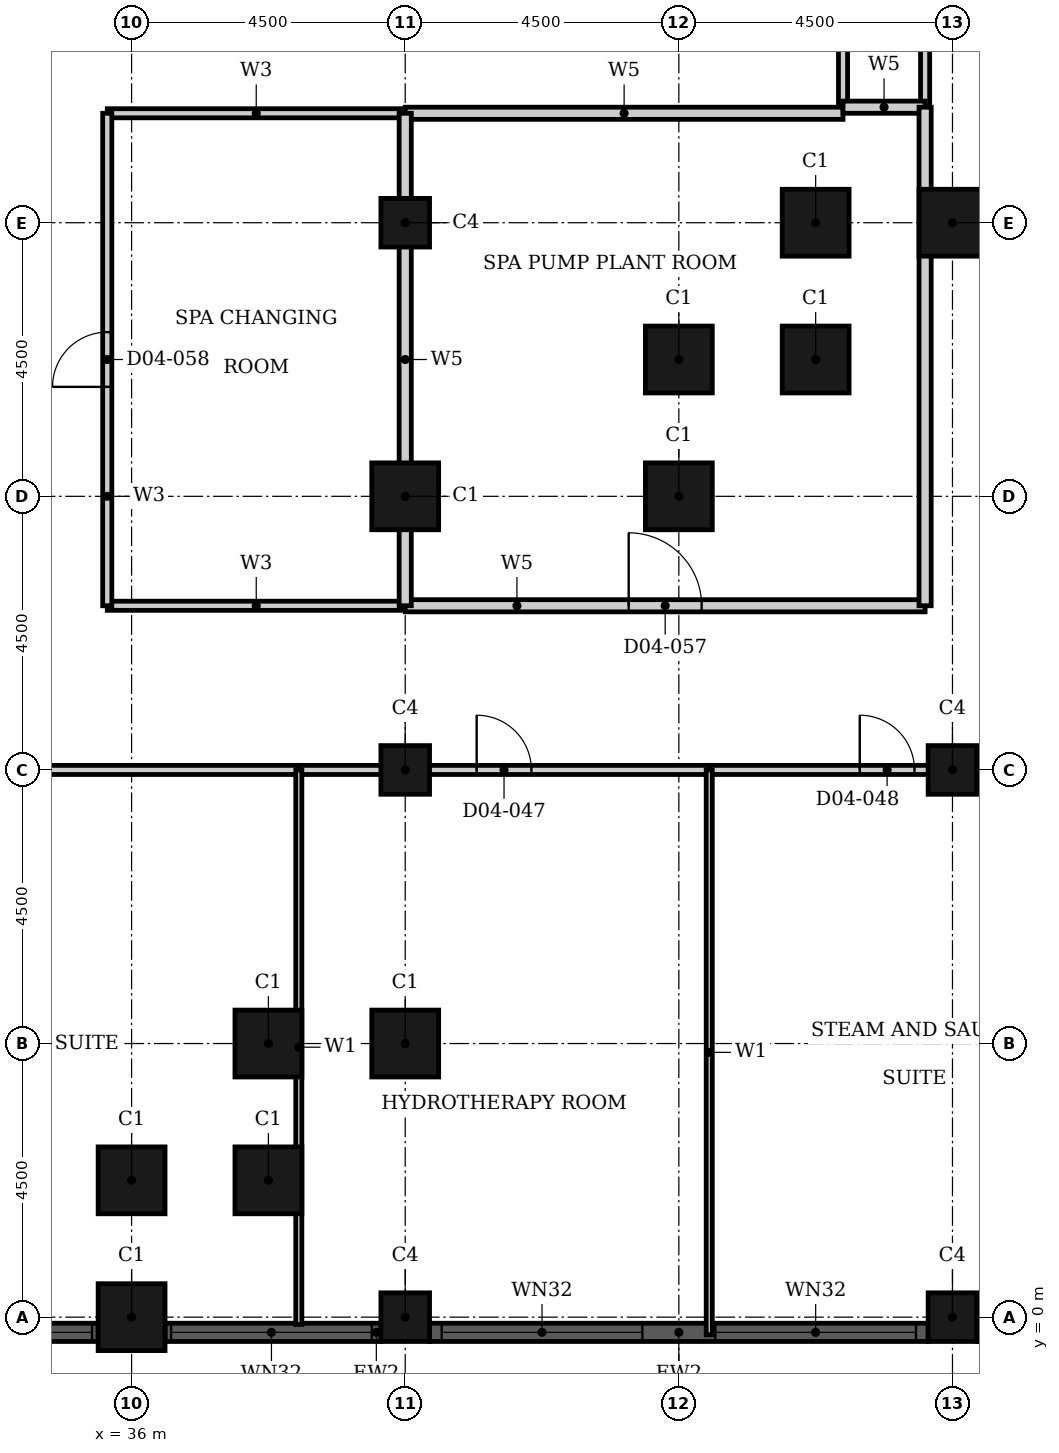
"""IFC4 building model, lengths in metres.
Left out: names, types, materials, properties, quantities, classifications, styles, units other than length and angle.
Written with IfcOpenShell. Run it as: python <this file> out.ifc"""

import sys

from ifc_helpers import new_model, si_unit, direction, frame, frame_2d, origin, origin_2d, place, context, subcontext, project, spatial, rectangle, hollow_rectangle, extrude, element, fill, save


model = new_model("IFC4")
c1 = context("Model", 3, precision=1e-05, world=origin(), true_north=direction((0.0, 1.0)))
c2 = subcontext(c1, "Body", "Model", "MODEL_VIEW")
j1 = project(units=[si_unit("LENGTHUNIT", "METRE"), si_unit("PLANEANGLEUNIT", "RADIAN")], contexts=[c1])
p1 = place(None, origin())
s1 = spatial("IfcSite", under=j1, at=p1, CompositionType="ELEMENT")
p2 = place(p1, origin())
s2 = spatial("IfcBuilding", under=s1, at=p2, CompositionType="ELEMENT")
p3 = place(p2, frame((0.0, 0.0, 24.0)))
s3 = spatial("IfcBuildingStorey", under=s2, at=p3, CompositionType="ELEMENT", Elevation=24.0)
for number, where, z_axis, x_axis in (
    (1, (36.0, 0.0, 0.0), (0.0, 0.0, 1.0), (1.0, 0.0, 0.0)),
    (2, (36.0, 2.25, 0.0), (0.0, 0.0, 1.0), (1.0, 0.0, 0.0)),
    (3, (38.25, 2.25, 0.0), (0.0, 0.0, 1.0), (1.0, 0.0, 0.0)),
    (4, (38.25, 4.5, 0.0), (0.0, 0.0, 1.0), (1.0, 0.0, 0.0)),
    (5, (40.5, 4.5, 0.0), (0.0, 0.0, 1.0), (1.0, 0.0, 0.0)),
    (6, (40.5, 13.5, 0.0), (0.0, 0.0, 1.0), (1.0, 0.0, 0.0)),
    (7, (45.0, 13.5, 0.0), (0.0, 0.0, 1.0), (1.0, 0.0, 0.0)),
    (8, (45.0, 15.75, 0.0), (0.0, 0.0, 1.0), (1.0, 0.0, 0.0)),
    (9, (47.25, 15.75, 0.0), (0.0, 0.0, 1.0), (1.0, 0.0, 0.0)),
    (10, (47.25, 18.0, 0.0), (0.0, 0.0, 1.0), (1.0, 0.0, 0.0)),
    (11, (49.5, 18.0, 0.0), (0.0, 0.0, 1.0), (1.0, 0.0, 0.0)),
):
    element("IfcColumn", number, at=place(p3, frame(where, z_axis=z_axis, x_axis=x_axis)), inside=s3, PredefinedType="COLUMN", context=c2, shape_type="SweptSolid", body=[
        extrude(hollow_rectangle(XDim=1.1, YDim=1.1, WallThickness=0.036, at=origin_2d()), origin(), (0.0, 0.0, 1.0), 4.8),
    ])
for number, where, z_axis, x_axis in (
    (12, (40.5, 0.0, 0.0), (0.0, 0.0, 1.0), (1.0, 0.0, 0.0)),
    (13, (49.5, 0.0, 0.0), (0.0, 0.0, 1.0), (1.0, 0.0, 0.0)),
    (14, (40.5, 9.0, 0.0), (0.0, 0.0, 1.0), (1.0, 0.0, 0.0)),
    (15, (40.5, 18.0, 0.0), (0.0, 0.0, 1.0), (1.0, 0.0, 0.0)),
    (16, (49.5, 9.0, 0.0), (0.0, 0.0, 1.0), (1.0, 0.0, 0.0)),
):
    element("IfcColumn", number, at=place(p3, frame(where, z_axis=z_axis, x_axis=x_axis)), inside=s3, PredefinedType="COLUMN", context=c2, shape_type="SweptSolid", body=[
        extrude(hollow_rectangle(XDim=0.8, YDim=0.8, WallThickness=0.025, at=origin_2d()), origin(), (0.0, 0.0, 1.0), 4.8),
    ])
p4 = place(p3, frame((31.9, -0.25, 0.0), z_axis=(0.0, 0.0, 1.0), x_axis=(1.0, 0.0, 0.0)))
e17 = element("IfcWall", 17, at=p4, inside=s3, PredefinedType="SOLIDWALL", context=c2, shape_type="SweptSolid", body=[
    extrude(rectangle(XDim=3.55, YDim=0.3, at=frame_2d((1.775, 0.0))), origin(), (0.0, 0.0, 1.0), 4.8),
])
p5 = place(p4, frame((0.15, 0.0, 0.9)))
e18 = element("IfcOpeningElement", 18, at=p5, cuts=e17, PredefinedType="OPENING", context=c2, shape_type="SweptSolid", body=[
    extrude(rectangle(XDim=3.3, YDim=2.9, at=frame_2d((1.65, 1.45))), frame((0.0, 0.16, 0.0), z_axis=(0.0, -1.0, 0.0), x_axis=(1.0, 0.0, 0.0)), (0.0, 0.0, 1.0), 0.32),
])
p6 = place(p3, frame((36.55, -0.25, 0.0), z_axis=(0.0, 0.0, 1.0), x_axis=(1.0, 0.0, 0.0)))
e19 = element("IfcWall", 19, at=p6, inside=s3, PredefinedType="SOLIDWALL", context=c2, shape_type="SweptSolid", body=[
    extrude(rectangle(XDim=3.55, YDim=0.3, at=frame_2d((1.775, 0.0))), origin(), (0.0, 0.0, 1.0), 4.8),
])
p7 = place(p6, frame((0.1, 0.0, 0.9)))
e20 = element("IfcOpeningElement", 20, at=p7, cuts=e19, PredefinedType="OPENING", context=c2, shape_type="SweptSolid", body=[
    extrude(rectangle(XDim=3.3, YDim=2.9, at=frame_2d((1.65, 1.45))), frame((0.0, 0.16, 0.0), z_axis=(0.0, -1.0, 0.0), x_axis=(1.0, 0.0, 0.0)), (0.0, 0.0, 1.0), 0.32),
])
p8 = place(p3, frame((40.9, -0.25, 0.0), z_axis=(0.0, 0.0, 1.0), x_axis=(1.0, 0.0, 0.0)))
e21 = element("IfcWall", 21, at=p8, inside=s3, PredefinedType="SOLIDWALL", context=c2, shape_type="SweptSolid", body=[
    extrude(rectangle(XDim=8.2, YDim=0.3, at=frame_2d((4.1, 0.0))), origin(), (0.0, 0.0, 1.0), 4.8),
])
p9 = place(p8, frame((0.2, 0.0, 0.9)))
e22 = element("IfcOpeningElement", 22, at=p9, cuts=e21, PredefinedType="OPENING", context=c2, shape_type="SweptSolid", body=[
    extrude(rectangle(XDim=3.3, YDim=2.9, at=frame_2d((1.65, 1.45))), frame((0.0, 0.16, 0.0), z_axis=(0.0, -1.0, 0.0), x_axis=(1.0, 0.0, 0.0)), (0.0, 0.0, 1.0), 0.32),
])
p10 = place(p8, frame((4.7, 0.0, 0.9)))
e23 = element("IfcOpeningElement", 23, at=p10, cuts=e21, PredefinedType="OPENING", context=c2, shape_type="SweptSolid", body=[
    extrude(rectangle(XDim=3.3, YDim=2.9, at=frame_2d((1.65, 1.45))), frame((0.0, 0.16, 0.0), z_axis=(0.0, -1.0, 0.0), x_axis=(1.0, 0.0, 0.0)), (0.0, 0.0, 1.0), 0.32),
])
p11 = place(p3, frame((49.9, -0.25, 0.0), z_axis=(0.0, 0.0, 1.0), x_axis=(1.0, 0.0, 0.0)))
e24 = element("IfcWall", 24, at=p11, inside=s3, PredefinedType="SOLIDWALL", context=c2, shape_type="SweptSolid", body=[
    extrude(rectangle(XDim=8.2, YDim=0.3, at=frame_2d((4.1, 0.0))), origin(), (0.0, 0.0, 1.0), 4.8),
])
p12 = place(p11, frame((0.2, 0.0, 0.9)))
e25 = element("IfcOpeningElement", 25, at=p12, cuts=e24, PredefinedType="OPENING", context=c2, shape_type="SweptSolid", body=[
    extrude(rectangle(XDim=3.3, YDim=2.9, at=frame_2d((1.65, 1.45))), frame((0.0, 0.16, 0.0), z_axis=(0.0, -1.0, 0.0), x_axis=(1.0, 0.0, 0.0)), (0.0, 0.0, 1.0), 0.32),
])
p13 = place(p11, frame((4.7, 0.0, 0.9)))
e26 = element("IfcOpeningElement", 26, at=p13, cuts=e24, PredefinedType="OPENING", context=c2, shape_type="SweptSolid", body=[
    extrude(rectangle(XDim=3.3, YDim=2.9, at=frame_2d((1.65, 1.45))), frame((0.0, 0.16, 0.0), z_axis=(0.0, -1.0, 0.0), x_axis=(1.0, 0.0, 0.0)), (0.0, 0.0, 1.0), 0.32),
])
for number, where, z_axis, x_axis in (
    (27, (35.6, 11.7, 0.0), (0.0, 0.0, 1.0), (1.0, 0.0, 0.0)),
    (28, (35.6, 19.8, 0.0), (0.0, 0.0, 1.0), (1.0, 0.0, 0.0)),
):
    element("IfcWall", number, at=place(p3, frame(where, z_axis=z_axis, x_axis=x_axis)), inside=s3, PredefinedType="PARTITIONING", context=c2, shape_type="SweptSolid", body=[
        extrude(rectangle(XDim=4.9, YDim=0.15, at=frame_2d((2.45, 0.0))), origin(), (0.0, 0.0, 1.0), 4.45),
    ])
p14 = place(p3, frame((28.75, 9.0, 0.0), z_axis=(0.0, 0.0, 1.0), x_axis=(1.0, 0.0, 0.0)))
e29 = element("IfcWall", 29, at=p14, inside=s3, PredefinedType="PARTITIONING", context=c2, shape_type="SweptSolid", body=[
    extrude(rectangle(XDim=10.0, YDim=0.15, at=frame_2d((5.0, 0.0))), origin(), (0.0, 0.0, 1.0), 4.45),
])
p15 = place(p14, frame((4.55, 0.0, 0.0)))
e30 = element("IfcOpeningElement", 30, at=p15, cuts=e29, PredefinedType="OPENING", context=c2, shape_type="SweptSolid", body=[
    extrude(rectangle(XDim=0.9, YDim=2.1, at=frame_2d((0.45, 1.05))), frame((0.0, 0.085, 0.0), z_axis=(0.0, -1.0, 0.0), x_axis=(1.0, 0.0, 0.0)), (0.0, 0.0, 1.0), 0.17),
])
p16 = place(p3, frame((38.75, 9.0, 0.0), z_axis=(0.0, 0.0, 1.0), x_axis=(1.0, 0.0, 0.0)))
e31 = element("IfcWall", 31, at=p16, inside=s3, PredefinedType="PARTITIONING", context=c2, shape_type="SweptSolid", body=[
    extrude(rectangle(XDim=6.75, YDim=0.15, at=frame_2d((3.375, 0.0))), origin(), (0.0, 0.0, 1.0), 4.45),
])
p17 = place(p16, frame((2.925, 0.0, 0.0)))
e32 = element("IfcOpeningElement", 32, at=p17, cuts=e31, PredefinedType="OPENING", context=c2, shape_type="SweptSolid", body=[
    extrude(rectangle(XDim=0.9, YDim=2.1, at=frame_2d((0.45, 1.05))), frame((0.0, 0.085, 0.0), z_axis=(0.0, -1.0, 0.0), x_axis=(1.0, 0.0, 0.0)), (0.0, 0.0, 1.0), 0.17),
])
p18 = place(p3, frame((45.5, 9.0, 0.0), z_axis=(0.0, 0.0, 1.0), x_axis=(1.0, 0.0, 0.0)))
e33 = element("IfcWall", 33, at=p18, inside=s3, PredefinedType="PARTITIONING", context=c2, shape_type="SweptSolid", body=[
    extrude(rectangle(XDim=6.75, YDim=0.15, at=frame_2d((3.375, 0.0))), origin(), (0.0, 0.0, 1.0), 4.45),
])
p19 = place(p18, frame((2.475, 0.0, 0.0)))
e34 = element("IfcOpeningElement", 34, at=p19, cuts=e33, PredefinedType="OPENING", context=c2, shape_type="SweptSolid", body=[
    extrude(rectangle(XDim=0.9, YDim=2.1, at=frame_2d((0.45, 1.05))), frame((0.0, 0.085, 0.0), z_axis=(0.0, -1.0, 0.0), x_axis=(1.0, 0.0, 0.0)), (0.0, 0.0, 1.0), 0.17),
])
p20 = place(p3, frame((35.6, 11.7, 0.0), z_axis=(0.0, 0.0, 1.0), x_axis=(0.0, 1.0, 0.0)))
e35 = element("IfcWall", 35, at=p20, inside=s3, PredefinedType="PARTITIONING", context=c2, shape_type="SweptSolid", body=[
    extrude(rectangle(XDim=8.1, YDim=0.15, at=frame_2d((4.05, 0.0))), origin(), (0.0, 0.0, 1.0), 4.45),
])
p21 = place(p20, frame((3.6, 0.0, 0.0)))
e36 = element("IfcOpeningElement", 36, at=p21, cuts=e35, PredefinedType="OPENING", context=c2, shape_type="SweptSolid", body=[
    extrude(rectangle(XDim=0.9, YDim=2.1, at=frame_2d((0.45, 1.05))), frame((0.0, 0.085, 0.0), z_axis=(0.0, -1.0, 0.0), x_axis=(1.0, 0.0, 0.0)), (0.0, 0.0, 1.0), 0.17),
])
p22 = place(p3, frame((47.7, 19.9, 0.0), z_axis=(0.0, 0.0, 1.0), x_axis=(0.0, 1.0, 0.0)))
e37 = element("IfcWall", 37, at=p22, inside=s3, PredefinedType="PARTITIONING", context=c2, shape_type="SweptSolid", body=[
    extrude(rectangle(XDim=14.3, YDim=0.15, at=frame_2d((7.15, 0.0))), origin(), (0.0, 0.0, 1.0), 4.45),
])
p23 = place(p22, frame((6.7, 0.0, 0.0)))
e38 = element("IfcOpeningElement", 38, at=p23, cuts=e37, PredefinedType="OPENING", context=c2, shape_type="SweptSolid", body=[
    extrude(rectangle(XDim=0.9, YDim=2.1, at=frame_2d((0.45, 1.05))), frame((0.0, 0.085, 0.0), z_axis=(0.0, -1.0, 0.0), x_axis=(1.0, 0.0, 0.0)), (0.0, 0.0, 1.0), 0.17),
])
p24 = place(p3, frame((49.05, 19.9, 0.0), z_axis=(0.0, 0.0, 1.0), x_axis=(0.0, 1.0, 0.0)))
e39 = element("IfcWall", 39, at=p24, inside=s3, PredefinedType="PARTITIONING", context=c2, shape_type="SweptSolid", body=[
    extrude(rectangle(XDim=2.75, YDim=0.15, at=frame_2d((1.375, 0.0))), origin(), (0.0, 0.0, 1.0), 4.45),
])
p25 = place(p3, frame((38.75, -0.12, 0.0), z_axis=(0.0, 0.0, 1.0), x_axis=(0.0, 1.0, 0.0)))
e40 = element("IfcWall", 40, at=p25, inside=s3, PredefinedType="PARTITIONING", context=c2, shape_type="SweptSolid", body=[
    extrude(rectangle(XDim=9.12, YDim=0.1, at=frame_2d((4.56, 0.0))), origin(), (0.0, 0.0, 1.0), 4.45),
])
p26 = place(p3, frame((45.5, -0.29, 0.0), z_axis=(0.0, 0.0, 1.0), x_axis=(0.0, 1.0, 0.0)))
e41 = element("IfcWall", 41, at=p26, inside=s3, PredefinedType="PARTITIONING", context=c2, shape_type="SweptSolid", body=[
    extrude(rectangle(XDim=9.29, YDim=0.1, at=frame_2d((4.645, 0.0))), origin(), (0.0, 0.0, 1.0), 4.45),
])
p27 = place(p3, frame((40.5, 11.7, 0.0), z_axis=(0.0, 0.0, 1.0), x_axis=(1.0, 0.0, 0.0)))
e42 = element("IfcWall", 42, at=p27, inside=s3, PredefinedType="PARTITIONING", context=c2, shape_type="SweptSolid", body=[
    extrude(rectangle(XDim=8.55, YDim=0.2, at=frame_2d((4.275, 0.0))), origin(), (0.0, 0.0, 1.0), 4.45),
])
p28 = place(p27, frame((3.675, 0.0, 0.0)))
e43 = element("IfcOpeningElement", 43, at=p28, cuts=e42, PredefinedType="OPENING", context=c2, shape_type="SweptSolid", body=[
    extrude(rectangle(XDim=1.2, YDim=2.1, at=frame_2d((0.6, 1.05))), frame((0.0, 0.11, 0.0), z_axis=(0.0, -1.0, 0.0), x_axis=(1.0, 0.0, 0.0)), (0.0, 0.0, 1.0), 0.22),
])
p29 = place(p3, frame((40.5, 19.8, 0.0), z_axis=(0.0, 0.0, 1.0), x_axis=(1.0, 0.0, 0.0)))
e44 = element("IfcWall", 44, at=p29, inside=s3, PredefinedType="PARTITIONING", context=c2, shape_type="SweptSolid", body=[
    extrude(rectangle(XDim=7.2, YDim=0.2, at=frame_2d((3.6, 0.0))), origin(), (0.0, 0.0, 1.0), 4.45),
])
p30 = place(p3, frame((47.7, 19.9, 0.0), z_axis=(0.0, 0.0, 1.0), x_axis=(1.0, 0.0, 0.0)))
e45 = element("IfcWall", 45, at=p30, inside=s3, PredefinedType="PARTITIONING", context=c2, shape_type="SweptSolid", body=[
    extrude(rectangle(XDim=1.35, YDim=0.2, at=frame_2d((0.675, 0.0))), origin(), (0.0, 0.0, 1.0), 4.45),
])
p31 = place(p3, frame((40.5, 11.7, 0.0), z_axis=(0.0, 0.0, 1.0), x_axis=(0.0, 1.0, 0.0)))
e46 = element("IfcWall", 46, at=p31, inside=s3, PredefinedType="PARTITIONING", context=c2, shape_type="SweptSolid", body=[
    extrude(rectangle(XDim=8.1, YDim=0.2, at=frame_2d((4.05, 0.0))), origin(), (0.0, 0.0, 1.0), 4.45),
])
p32 = place(p3, frame((49.05, 11.7, 0.0), z_axis=(0.0, 0.0, 1.0), x_axis=(0.0, 1.0, 0.0)))
e47 = element("IfcWall", 47, at=p32, inside=s3, PredefinedType="PARTITIONING", context=c2, shape_type="SweptSolid", body=[
    extrude(rectangle(XDim=8.2, YDim=0.2, at=frame_2d((4.1, 0.0))), origin(), (0.0, 0.0, 1.0), 4.45),
])
p33 = place(p5, origin())
e48 = element("IfcWindow", 48, at=p33, inside=s3, PartitioningType="SINGLE_PANEL", PredefinedType="WINDOW", context=c2, shape_type="SweptSolid", body=[
    extrude(rectangle(XDim=3.3, YDim=2.9, at=frame_2d((1.65, 1.45))), frame((0.0, 0.03, 0.0), z_axis=(0.0, -1.0, 0.0), x_axis=(1.0, 0.0, 0.0)), (0.0, 0.0, 1.0), 0.06),
])
fill(e18, e48)
p34 = place(p7, origin())
e49 = element("IfcWindow", 49, at=p34, inside=s3, PartitioningType="SINGLE_PANEL", PredefinedType="WINDOW", context=c2, shape_type="SweptSolid", body=[
    extrude(rectangle(XDim=3.3, YDim=2.9, at=frame_2d((1.65, 1.45))), frame((0.0, 0.03, 0.0), z_axis=(0.0, -1.0, 0.0), x_axis=(1.0, 0.0, 0.0)), (0.0, 0.0, 1.0), 0.06),
])
fill(e20, e49)
p35 = place(p9, origin())
e50 = element("IfcWindow", 50, at=p35, inside=s3, PartitioningType="SINGLE_PANEL", PredefinedType="WINDOW", context=c2, shape_type="SweptSolid", body=[
    extrude(rectangle(XDim=3.3, YDim=2.9, at=frame_2d((1.65, 1.45))), frame((0.0, 0.03, 0.0), z_axis=(0.0, -1.0, 0.0), x_axis=(1.0, 0.0, 0.0)), (0.0, 0.0, 1.0), 0.06),
])
fill(e22, e50)
p36 = place(p10, origin())
e51 = element("IfcWindow", 51, at=p36, inside=s3, PartitioningType="SINGLE_PANEL", PredefinedType="WINDOW", context=c2, shape_type="SweptSolid", body=[
    extrude(rectangle(XDim=3.3, YDim=2.9, at=frame_2d((1.65, 1.45))), frame((0.0, 0.03, 0.0), z_axis=(0.0, -1.0, 0.0), x_axis=(1.0, 0.0, 0.0)), (0.0, 0.0, 1.0), 0.06),
])
fill(e23, e51)
p37 = place(p17, origin())
e52 = element("IfcDoor", 52, at=p37, inside=s3, OperationType="SINGLE_SWING_RIGHT", PredefinedType="DOOR", context=c2, shape_type="SweptSolid", body=[
    extrude(rectangle(XDim=0.9, YDim=2.1, at=frame_2d((0.45, 1.05))), frame((0.0, 0.025, 0.0), z_axis=(0.0, -1.0, 0.0), x_axis=(1.0, 0.0, 0.0)), (0.0, 0.0, 1.0), 0.05),
])
fill(e32, e52)
p38 = place(p19, origin())
e53 = element("IfcDoor", 53, at=p38, inside=s3, OperationType="SINGLE_SWING_LEFT", PredefinedType="DOOR", context=c2, shape_type="SweptSolid", body=[
    extrude(rectangle(XDim=0.9, YDim=2.1, at=frame_2d((0.45, 1.05))), frame((0.0, 0.025, 0.0), z_axis=(0.0, -1.0, 0.0), x_axis=(1.0, 0.0, 0.0)), (0.0, 0.0, 1.0), 0.05),
])
fill(e34, e53)
p39 = place(p28, origin())
e54 = element("IfcDoor", 54, at=p39, inside=s3, OperationType="SINGLE_SWING_RIGHT", PredefinedType="DOOR", context=c2, shape_type="SweptSolid", body=[
    extrude(rectangle(XDim=1.2, YDim=2.1, at=frame_2d((0.6, 1.05))), frame((0.0, 0.025, 0.0), z_axis=(0.0, -1.0, 0.0), x_axis=(1.0, 0.0, 0.0)), (0.0, 0.0, 1.0), 0.05),
])
fill(e43, e54)
p40 = place(p21, origin())
e55 = element("IfcDoor", 55, at=p40, inside=s3, OperationType="SINGLE_SWING_LEFT", PredefinedType="DOOR", context=c2, shape_type="SweptSolid", body=[
    extrude(rectangle(XDim=0.9, YDim=2.1, at=frame_2d((0.45, 1.05))), frame((0.0, 0.025, 0.0), z_axis=(0.0, -1.0, 0.0), x_axis=(1.0, 0.0, 0.0)), (0.0, 0.0, 1.0), 0.05),
])
fill(e36, e55)
save(model, sys.argv[1])
